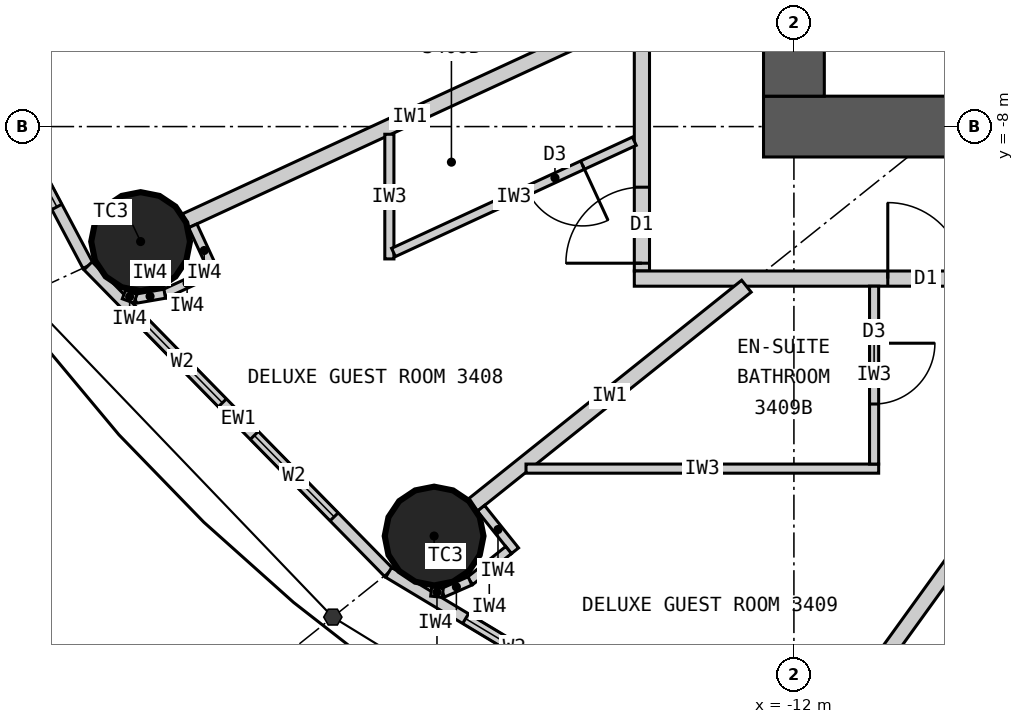
"""IFC4 building model, lengths in metres.
Left out: names, types, materials, properties, quantities, classifications, styles, units other than length and angle.
Written with IfcOpenShell. Run it as: python <this file> out.ifc"""

import sys

from ifc_helpers import new_model, si_unit, direction, frame, frame_2d, origin, origin_2d, place, context, subcontext, project, spatial, rectangle, circle, extrude, element, fill, save


model = new_model("IFC4")
c1 = context("Model", 3, precision=1e-05, world=origin(), true_north=direction((0.0, 1.0)))
c2 = subcontext(c1, "Body", "Model", "MODEL_VIEW")
j1 = project(units=[si_unit("LENGTHUNIT", "METRE"), si_unit("PLANEANGLEUNIT", "RADIAN")], contexts=[c1])
p1 = place(None, origin())
s1 = spatial("IfcSite", under=j1, at=p1, CompositionType="ELEMENT")
p2 = place(p1, origin())
s2 = spatial("IfcBuilding", under=s1, at=p2, CompositionType="ELEMENT")
p3 = place(p2, frame((0.0, 0.0, 132.0)))
s3 = spatial("IfcBuildingStorey", under=s2, at=p3, CompositionType="ELEMENT", Elevation=132.0)
for number, where, z_axis, x_axis in (
    (1, (-20.596, -9.513, 0.0), (0.0, 0.0, 1.0), (1.0, 0.0, 0.0)),
    (2, (-16.734, -13.387, 0.0), (0.0, 0.0, 1.0), (1.0, 0.0, 0.0)),
):
    element("IfcColumn", number, at=place(p3, frame(where, z_axis=z_axis, x_axis=x_axis)), inside=s3, PredefinedType="COLUMN", context=c2, shape_type="SweptSolid", body=[
        extrude(circle(Radius=0.65, at=origin_2d()), origin(), (0.0, 0.0, 1.0), 3.3),
    ])
p4 = place(p3, frame((12.4, -8.0, 0.0), z_axis=(0.0, 0.0, 1.0), x_axis=(-1.0, 0.0, 0.0)))
e3 = element("IfcWall", 3, at=p4, inside=s3, PredefinedType="SHEAR", context=c2, shape_type="SweptSolid", body=[
    extrude(rectangle(XDim=24.8, YDim=0.8, at=frame_2d((12.4, 0.0))), origin(), (0.0, 0.0, 1.0), 3.3),
])
p5 = place(p4, frame((11.1, 0.0, 0.0)))
e4 = element("IfcOpeningElement", 4, at=p5, cuts=e3, PredefinedType="OPENING", context=c2, shape_type="SweptSolid", body=[
    extrude(rectangle(XDim=1.2, YDim=2.2, at=frame_2d((0.6, 1.1))), frame((0.0, 0.41, 0.0), z_axis=(0.0, -1.0, 0.0), x_axis=(1.0, 0.0, 0.0)), (0.0, 0.0, 1.0), 0.82),
])
p6 = place(p4, frame((18.7, 0.0, 0.0)))
e5 = element("IfcOpeningElement", 5, at=p6, cuts=e3, PredefinedType="OPENING", context=c2, shape_type="SweptSolid", body=[
    extrude(rectangle(XDim=0.9, YDim=2.2, at=frame_2d((0.45, 1.1))), frame((0.0, 0.41, 0.0), z_axis=(0.0, -1.0, 0.0), x_axis=(1.0, 0.0, 0.0)), (0.0, 0.0, 1.0), 0.82),
])
p7 = place(p3, frame((-12.0, 7.6, 0.0), z_axis=(0.0, 0.0, 1.0), x_axis=(0.0, -1.0, 0.0)))
e6 = element("IfcWall", 6, at=p7, inside=s3, PredefinedType="SHEAR", context=c2, shape_type="SweptSolid", body=[
    extrude(rectangle(XDim=15.2, YDim=0.8, at=frame_2d((7.6, 0.0))), origin(), (0.0, 0.0, 1.0), 3.3),
])
p8 = place(p7, frame((6.7, 0.0, 0.0)))
e7 = element("IfcOpeningElement", 7, at=p8, cuts=e6, PredefinedType="OPENING", context=c2, shape_type="SweptSolid", body=[
    extrude(rectangle(XDim=1.8, YDim=2.2, at=frame_2d((0.9, 1.1))), frame((0.0, 0.41, 0.0), z_axis=(0.0, -1.0, 0.0), x_axis=(1.0, 0.0, 0.0)), (0.0, 0.0, 1.0), 0.82),
])
p9 = place(p3, frame((-23.792, -5.1, 0.0), z_axis=(0.0, 0.0, 1.0), x_axis=(0.467814388454, -0.883826735257, 0.0)))
e8 = element("IfcWall", 8, at=p9, inside=s3, PredefinedType="ELEMENTEDWALL", context=c2, shape_type="SweptSolid", body=[
    extrude(rectangle(XDim=5.354, YDim=0.15, at=frame_2d((2.677, 0.0))), origin(), (0.0, 0.0, 1.0), 3.12),
])
p10 = place(p9, frame((0.877, 0.0, 0.9)))
e9 = element("IfcOpeningElement", 9, at=p10, cuts=e8, PredefinedType="OPENING", context=c2, shape_type="SweptSolid", body=[
    extrude(rectangle(XDim=1.5, YDim=1.9, at=frame_2d((0.75, 0.95))), frame((0.0, 0.085, 0.0), z_axis=(0.0, -1.0, 0.0), x_axis=(1.0, 0.0, 0.0)), (0.0, 0.0, 1.0), 0.17),
])
p11 = place(p9, frame((2.977, 0.0, 0.9)))
e10 = element("IfcOpeningElement", 10, at=p11, cuts=e8, PredefinedType="OPENING", context=c2, shape_type="SweptSolid", body=[
    extrude(rectangle(XDim=1.5, YDim=1.9, at=frame_2d((0.75, 0.95))), frame((0.0, 0.085, 0.0), z_axis=(0.0, -1.0, 0.0), x_axis=(1.0, 0.0, 0.0)), (0.0, 0.0, 1.0), 0.17),
])
p12 = place(p3, frame((-21.287, -9.832, 0.0), z_axis=(0.0, 0.0, 1.0), x_axis=(0.700136650834, -0.714008872605, 0.0)))
e11 = element("IfcWall", 11, at=p12, inside=s3, PredefinedType="ELEMENTEDWALL", context=c2, shape_type="SweptSolid", body=[
    extrude(rectangle(XDim=5.649, YDim=0.15, at=frame_2d((2.825, 0.0))), origin(), (0.0, 0.0, 1.0), 3.12),
])
p13 = place(p12, frame((1.025, 0.0, 0.9)))
e12 = element("IfcOpeningElement", 12, at=p13, cuts=e11, PredefinedType="OPENING", context=c2, shape_type="SweptSolid", body=[
    extrude(rectangle(XDim=1.5, YDim=1.9, at=frame_2d((0.75, 0.95))), frame((0.0, 0.085, 0.0), z_axis=(0.0, -1.0, 0.0), x_axis=(1.0, 0.0, 0.0)), (0.0, 0.0, 1.0), 0.17),
])
p14 = place(p12, frame((3.125, 0.0, 0.9)))
e13 = element("IfcOpeningElement", 13, at=p14, cuts=e11, PredefinedType="OPENING", context=c2, shape_type="SweptSolid", body=[
    extrude(rectangle(XDim=1.5, YDim=1.9, at=frame_2d((0.75, 0.95))), frame((0.0, 0.085, 0.0), z_axis=(0.0, -1.0, 0.0), x_axis=(1.0, 0.0, 0.0)), (0.0, 0.0, 1.0), 0.17),
])
p15 = place(p3, frame((-17.332, -13.866, 0.0), z_axis=(0.0, 0.0, 1.0), x_axis=(0.857308573723, -0.514802884044, 0.0)))
e14 = element("IfcWall", 14, at=p15, inside=s3, PredefinedType="ELEMENTEDWALL", context=c2, shape_type="SweptSolid", body=[
    extrude(rectangle(XDim=5.961, YDim=0.15, at=frame_2d((2.98, 0.0))), origin(), (0.0, 0.0, 1.0), 3.12),
])
p16 = place(p15, frame((1.181, 0.0, 0.9)))
e15 = element("IfcOpeningElement", 15, at=p16, cuts=e14, PredefinedType="OPENING", context=c2, shape_type="SweptSolid", body=[
    extrude(rectangle(XDim=1.5, YDim=1.9, at=frame_2d((0.75, 0.95))), frame((0.0, 0.085, 0.0), z_axis=(0.0, -1.0, 0.0), x_axis=(1.0, 0.0, 0.0)), (0.0, 0.0, 1.0), 0.17),
])
p17 = place(p15, frame((3.281, 0.0, 0.9)))
e16 = element("IfcOpeningElement", 16, at=p17, cuts=e14, PredefinedType="OPENING", context=c2, shape_type="SweptSolid", body=[
    extrude(rectangle(XDim=1.5, YDim=1.9, at=frame_2d((0.75, 0.95))), frame((0.0, 0.085, 0.0), z_axis=(0.0, -1.0, 0.0), x_axis=(1.0, 0.0, 0.0)), (0.0, 0.0, 1.0), 0.17),
])
p18 = place(p3, frame((-14.0, 9.9, 0.0), z_axis=(0.0, 0.0, 1.0), x_axis=(0.0, -1.0, 0.0)))
e17 = element("IfcWall", 17, at=p18, inside=s3, PredefinedType="PARTITIONING", context=c2, shape_type="SweptSolid", body=[
    extrude(rectangle(XDim=19.8, YDim=0.2, at=frame_2d((9.9, 0.0))), origin(), (0.0, 0.0, 1.0), 3.12),
])
p19 = place(p18, frame((2.822, 0.0, 0.0)))
e18 = element("IfcOpeningElement", 18, at=p19, cuts=e17, PredefinedType="OPENING", context=c2, shape_type="SweptSolid", body=[
    extrude(rectangle(XDim=1.0, YDim=2.2, at=frame_2d((0.5, 1.1))), frame((0.0, 0.11, 0.0), z_axis=(0.0, -1.0, 0.0), x_axis=(1.0, 0.0, 0.0)), (0.0, 0.0, 1.0), 0.22),
])
p20 = place(p18, frame((13.742, 0.0, 0.0)))
e19 = element("IfcOpeningElement", 19, at=p20, cuts=e17, PredefinedType="OPENING", context=c2, shape_type="SweptSolid", body=[
    extrude(rectangle(XDim=1.0, YDim=2.2, at=frame_2d((0.5, 1.1))), frame((0.0, 0.11, 0.0), z_axis=(0.0, -1.0, 0.0), x_axis=(1.0, 0.0, 0.0)), (0.0, 0.0, 1.0), 0.22),
])
p21 = place(p18, frame((18.698, 0.0, 0.0)))
e20 = element("IfcOpeningElement", 20, at=p21, cuts=e17, PredefinedType="OPENING", context=c2, shape_type="SweptSolid", body=[
    extrude(rectangle(XDim=1.0, YDim=2.2, at=frame_2d((0.5, 1.1))), frame((0.0, 0.11, 0.0), z_axis=(0.0, -1.0, 0.0), x_axis=(1.0, 0.0, 0.0)), (0.0, 0.0, 1.0), 0.22),
])
p22 = place(p3, frame((-3.283, -10.0, 0.0), z_axis=(0.0, 0.0, 1.0), x_axis=(-1.0, 0.0, 0.0)))
e21 = element("IfcWall", 21, at=p22, inside=s3, PredefinedType="PARTITIONING", context=c2, shape_type="SweptSolid", body=[
    extrude(rectangle(XDim=10.817, YDim=0.2, at=frame_2d((5.409, 0.0))), origin(), (0.0, 0.0, 1.0), 3.12),
])
p23 = place(p22, frame((6.482, 0.0, 0.0)))
e22 = element("IfcOpeningElement", 22, at=p23, cuts=e21, PredefinedType="OPENING", context=c2, shape_type="SweptSolid", body=[
    extrude(rectangle(XDim=1.0, YDim=2.2, at=frame_2d((0.5, 1.1))), frame((0.0, 0.11, 0.0), z_axis=(0.0, -1.0, 0.0), x_axis=(1.0, 0.0, 0.0)), (0.0, 0.0, 1.0), 0.22),
])
p24 = place(p3, frame((-14.1, -6.512, 0.0), z_axis=(0.0, 0.0, 1.0), x_axis=(-0.907833019998, -0.419331858797, 0.0)))
e23 = element("IfcWall", 23, at=p24, inside=s3, PredefinedType="PARTITIONING", context=c2, shape_type="SweptSolid", body=[
    extrude(rectangle(XDim=6.505, YDim=0.2, at=frame_2d((3.252, 0.0))), origin(), (0.0, 0.0, 1.0), 2.22),
])
p25 = place(p3, frame((-12.625, -10.1, 0.0), z_axis=(0.0, 0.0, 1.0), x_axis=(-0.780863644897, -0.624701503182, 0.0)))
e24 = element("IfcWall", 24, at=p25, inside=s3, PredefinedType="PARTITIONING", context=c2, shape_type="SweptSolid", body=[
    extrude(rectangle(XDim=4.612, YDim=0.2, at=frame_2d((2.306, 0.0))), origin(), (0.0, 0.0, 1.0), 2.27),
])
p26 = place(p3, frame((-7.289, -10.1, 0.0), z_axis=(0.0, 0.0, 1.0), x_axis=(-0.585217367024, -0.81087645997, 0.0)))
e25 = element("IfcWall", 25, at=p26, inside=s3, PredefinedType="PARTITIONING", context=c2, shape_type="SweptSolid", body=[
    extrude(rectangle(XDim=7.016, YDim=0.2, at=frame_2d((3.508, 0.0))), origin(), (0.0, 0.0, 1.0), 2.27),
])
p27 = place(p3, frame((-17.323, -8.101, 0.0), z_axis=(0.0, 0.0, 1.0), x_axis=(0.0, -1.0, 0.0)))
e26 = element("IfcWall", 26, at=p27, inside=s3, PredefinedType="PARTITIONING", context=c2, shape_type="SweptSolid", body=[
    extrude(rectangle(XDim=1.64, YDim=0.12, at=frame_2d((0.82, 0.0))), origin(), (0.0, 0.0, 1.0), 3.12),
])
p28 = place(p3, frame((-14.1, -8.193, 0.0), z_axis=(0.0, 0.0, 1.0), x_axis=(-0.907836493557, -0.419324338628, 0.0)))
e27 = element("IfcWall", 27, at=p28, inside=s3, PredefinedType="PARTITIONING", context=c2, shape_type="SweptSolid", body=[
    extrude(rectangle(XDim=3.49, YDim=0.12, at=frame_2d((1.745, 0.0))), origin(), (0.0, 0.0, 1.0), 3.12),
])
p29 = place(p28, frame((0.75, 0.0, 0.0)))
e28 = element("IfcOpeningElement", 28, at=p29, cuts=e27, PredefinedType="OPENING", context=c2, shape_type="SweptSolid", body=[
    extrude(rectangle(XDim=0.8, YDim=2.1, at=frame_2d((0.4, 1.05))), frame((0.0, 0.07, 0.0), z_axis=(0.0, -1.0, 0.0), x_axis=(1.0, 0.0, 0.0)), (0.0, 0.0, 1.0), 0.14),
])
p30 = place(p3, frame((-15.525, -12.5, 0.0), z_axis=(0.0, 0.0, 1.0), x_axis=(1.0, 0.0, 0.0)))
e29 = element("IfcWall", 29, at=p30, inside=s3, PredefinedType="PARTITIONING", context=c2, shape_type="SweptSolid", body=[
    extrude(rectangle(XDim=4.64, YDim=0.12, at=frame_2d((2.32, 0.0))), origin(), (0.0, 0.0, 1.0), 3.12),
])
p31 = place(p3, frame((-10.945, -10.1, 0.0), z_axis=(0.0, 0.0, 1.0), x_axis=(0.0, -1.0, 0.0)))
e30 = element("IfcWall", 30, at=p31, inside=s3, PredefinedType="PARTITIONING", context=c2, shape_type="SweptSolid", body=[
    extrude(rectangle(XDim=2.34, YDim=0.12, at=frame_2d((1.17, 0.0))), origin(), (0.0, 0.0, 1.0), 3.12),
])
p32 = place(p31, frame((0.75, 0.0, 0.0)))
e31 = element("IfcOpeningElement", 31, at=p32, cuts=e30, PredefinedType="OPENING", context=c2, shape_type="SweptSolid", body=[
    extrude(rectangle(XDim=0.8, YDim=2.1, at=frame_2d((0.4, 1.05))), frame((0.0, 0.07, 0.0), z_axis=(0.0, -1.0, 0.0), x_axis=(1.0, 0.0, 0.0)), (0.0, 0.0, 1.0), 0.14),
])
p33 = place(p3, frame((-19.909, -9.306, 0.0), z_axis=(0.0, 0.0, 1.0), x_axis=(0.419296148934, -0.90784951368, 0.0)))
e32 = element("IfcWall", 32, at=p33, inside=s3, PredefinedType="PARTITIONING", context=c2, shape_type="SweptSolid", body=[
    extrude(rectangle(XDim=0.716, YDim=0.12, at=frame_2d((0.358, 0.0))), origin(), (0.0, 0.0, 1.0), 3.12),
])
p34 = place(p3, frame((-19.689, -9.926, 0.0), z_axis=(0.0, 0.0, 1.0), x_axis=(-0.907893409272, -0.419201094227, 0.0)))
e33 = element("IfcWall", 33, at=p34, inside=s3, PredefinedType="PARTITIONING", context=c2, shape_type="SweptSolid", body=[
    extrude(rectangle(XDim=0.65, YDim=0.12, at=frame_2d((0.325, 0.0))), origin(), (0.0, 0.0, 1.0), 3.12),
])
p35 = place(p3, frame((-20.279, -10.199, 0.0), z_axis=(0.0, 0.0, 1.0), x_axis=(-0.985380740712, -0.170366651181, 0.0)))
e34 = element("IfcWall", 34, at=p35, inside=s3, PredefinedType="PARTITIONING", context=c2, shape_type="SweptSolid", body=[
    extrude(rectangle(XDim=0.391, YDim=0.12, at=frame_2d((0.196, 0.0))), origin(), (0.0, 0.0, 1.0), 3.12),
])
p36 = place(p3, frame((-20.664, -10.265, 0.0), z_axis=(0.0, 0.0, 1.0), x_axis=(-0.938058651481, 0.346476501918, 0.0)))
e35 = element("IfcWall", 35, at=p36, inside=s3, PredefinedType="PARTITIONING", context=c2, shape_type="SweptSolid", body=[
    extrude(rectangle(XDim=0.161, YDim=0.12, at=frame_2d((0.081, 0.0))), origin(), (0.0, 0.0, 1.0), 3.12),
])
p37 = place(p3, frame((-16.117, -13.022, 0.0), z_axis=(0.0, 0.0, 1.0), x_axis=(0.62465344249, -0.780902091677, 0.0)))
e36 = element("IfcWall", 36, at=p37, inside=s3, PredefinedType="PARTITIONING", context=c2, shape_type="SweptSolid", body=[
    extrude(rectangle(XDim=0.716, YDim=0.12, at=frame_2d((0.358, 0.0))), origin(), (0.0, 0.0, 1.0), 3.12),
])
p38 = place(p3, frame((-15.754, -13.571, 0.0), z_axis=(0.0, 0.0, 1.0), x_axis=(-0.780905453553, -0.624649239663, 0.0)))
e37 = element("IfcWall", 37, at=p38, inside=s3, PredefinedType="PARTITIONING", context=c2, shape_type="SweptSolid", body=[
    extrude(rectangle(XDim=0.65, YDim=0.12, at=frame_2d((0.325, 0.0))), origin(), (0.0, 0.0, 1.0), 3.12),
])
p39 = place(p3, frame((-16.262, -13.977, 0.0), z_axis=(0.0, 0.0, 1.0), x_axis=(-0.915985403703, -0.401211590314, 0.0)))
e38 = element("IfcWall", 38, at=p39, inside=s3, PredefinedType="PARTITIONING", context=c2, shape_type="SweptSolid", body=[
    extrude(rectangle(XDim=0.391, YDim=0.12, at=frame_2d((0.196, 0.0))), origin(), (0.0, 0.0, 1.0), 3.12),
])
p40 = place(p3, frame((-16.62, -14.134, 0.0), z_axis=(0.0, 0.0, 1.0), x_axis=(-0.993941871493, 0.109907033867, 0.0)))
e39 = element("IfcWall", 39, at=p40, inside=s3, PredefinedType="PARTITIONING", context=c2, shape_type="SweptSolid", body=[
    extrude(rectangle(XDim=0.153, YDim=0.12, at=frame_2d((0.077, 0.0))), origin(), (0.0, 0.0, 1.0), 3.12),
])
p41 = place(p11, origin())
e40 = element("IfcWindow", 40, at=p41, inside=s3, PartitioningType="SINGLE_PANEL", PredefinedType="WINDOW", context=c2, shape_type="SweptSolid", body=[
    extrude(rectangle(XDim=1.5, YDim=1.9, at=frame_2d((0.75, 0.95))), frame((0.0, 0.03, 0.0), z_axis=(0.0, -1.0, 0.0), x_axis=(1.0, 0.0, 0.0)), (0.0, 0.0, 1.0), 0.06),
])
fill(e10, e40)
p42 = place(p13, origin())
e41 = element("IfcWindow", 41, at=p42, inside=s3, PartitioningType="SINGLE_PANEL", PredefinedType="WINDOW", context=c2, shape_type="SweptSolid", body=[
    extrude(rectangle(XDim=1.5, YDim=1.9, at=frame_2d((0.75, 0.95))), frame((0.0, 0.03, 0.0), z_axis=(0.0, -1.0, 0.0), x_axis=(1.0, 0.0, 0.0)), (0.0, 0.0, 1.0), 0.06),
])
fill(e12, e41)
p43 = place(p14, origin())
e42 = element("IfcWindow", 42, at=p43, inside=s3, PartitioningType="SINGLE_PANEL", PredefinedType="WINDOW", context=c2, shape_type="SweptSolid", body=[
    extrude(rectangle(XDim=1.5, YDim=1.9, at=frame_2d((0.75, 0.95))), frame((0.0, 0.03, 0.0), z_axis=(0.0, -1.0, 0.0), x_axis=(1.0, 0.0, 0.0)), (0.0, 0.0, 1.0), 0.06),
])
fill(e13, e42)
p44 = place(p16, origin())
e43 = element("IfcWindow", 43, at=p44, inside=s3, PartitioningType="SINGLE_PANEL", PredefinedType="WINDOW", context=c2, shape_type="SweptSolid", body=[
    extrude(rectangle(XDim=1.5, YDim=1.9, at=frame_2d((0.75, 0.95))), frame((0.0, 0.03, 0.0), z_axis=(0.0, -1.0, 0.0), x_axis=(1.0, 0.0, 0.0)), (0.0, 0.0, 1.0), 0.06),
])
fill(e15, e43)
p45 = place(p29, origin())
e44 = element("IfcDoor", 44, at=p45, inside=s3, OperationType="SINGLE_SWING_LEFT", PredefinedType="DOOR", context=c2, shape_type="SweptSolid", body=[
    extrude(rectangle(XDim=0.8, YDim=2.1, at=frame_2d((0.4, 1.05))), frame((0.0, 0.025, 0.0), z_axis=(0.0, -1.0, 0.0), x_axis=(1.0, 0.0, 0.0)), (0.0, 0.0, 1.0), 0.05),
])
fill(e28, e44)
p46 = place(p21, origin())
e45 = element("IfcDoor", 45, at=p46, inside=s3, OperationType="SINGLE_SWING_RIGHT", PredefinedType="DOOR", context=c2, shape_type="SweptSolid", body=[
    extrude(rectangle(XDim=1.0, YDim=2.2, at=frame_2d((0.5, 1.1))), frame((0.0, 0.025, 0.0), z_axis=(0.0, -1.0, 0.0), x_axis=(1.0, 0.0, 0.0)), (0.0, 0.0, 1.0), 0.05),
])
fill(e20, e45)
p47 = place(p32, origin())
e46 = element("IfcDoor", 46, at=p47, inside=s3, OperationType="SINGLE_SWING_LEFT", PredefinedType="DOOR", context=c2, shape_type="SweptSolid", body=[
    extrude(rectangle(XDim=0.8, YDim=2.1, at=frame_2d((0.4, 1.05))), frame((0.0, 0.025, 0.0), z_axis=(0.0, -1.0, 0.0), x_axis=(1.0, 0.0, 0.0)), (0.0, 0.0, 1.0), 0.05),
])
fill(e31, e46)
p48 = place(p23, origin())
e47 = element("IfcDoor", 47, at=p48, inside=s3, OperationType="SINGLE_SWING_RIGHT", PredefinedType="DOOR", context=c2, shape_type="SweptSolid", body=[
    extrude(rectangle(XDim=1.0, YDim=2.2, at=frame_2d((0.5, 1.1))), frame((0.0, 0.025, 0.0), z_axis=(0.0, -1.0, 0.0), x_axis=(1.0, 0.0, 0.0)), (0.0, 0.0, 1.0), 0.05),
])
fill(e22, e47)
save(model, sys.argv[1])
